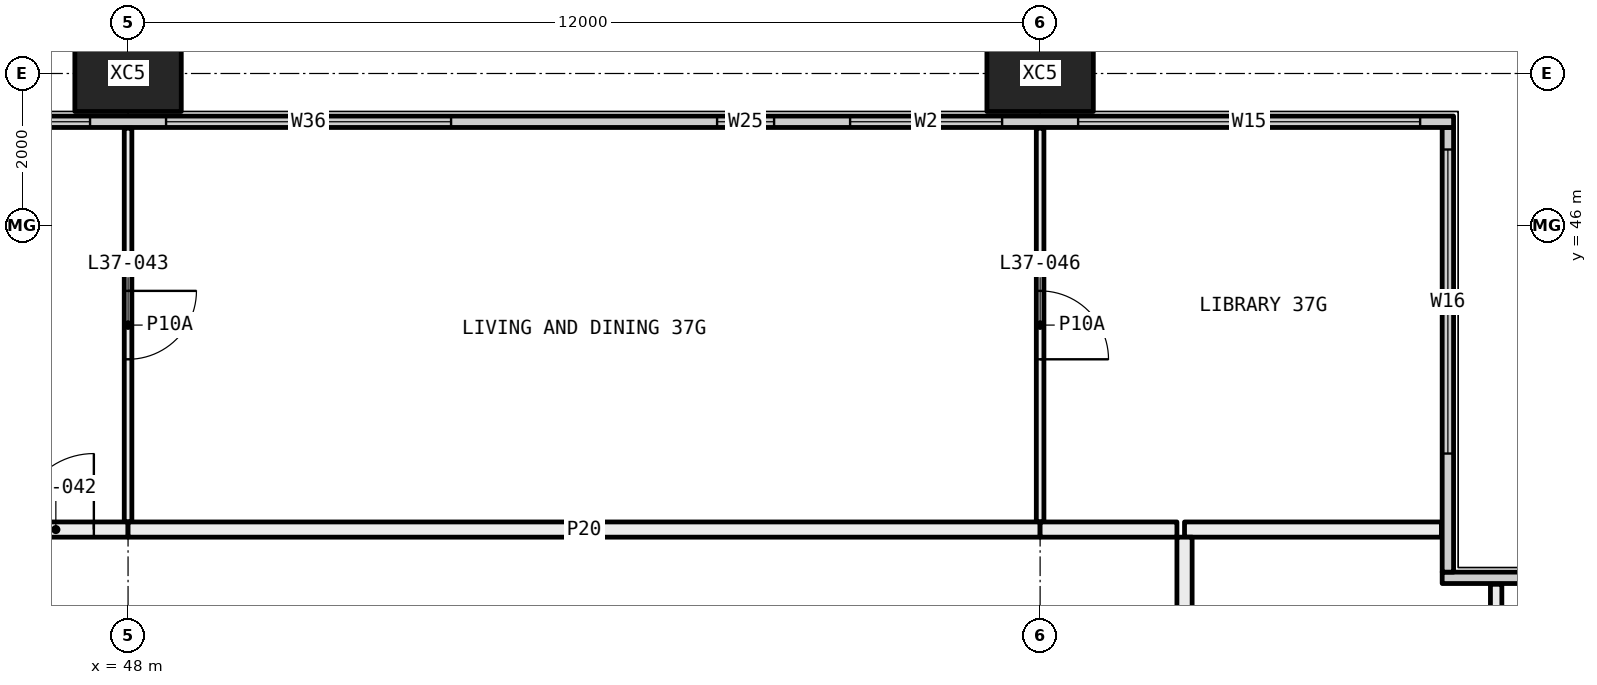
"""IFC4 building model, lengths in metres.
Left out: names, types, materials, properties, quantities, classifications, styles, units other than length and angle.
Written with IfcOpenShell. Run it as: python <this file> out.ifc"""

import sys

from ifc_helpers import new_model, si_unit, direction, frame, frame_2d, origin, origin_2d, place, context, subcontext, project, spatial, rectangle, hollow_rectangle, extrude, element, fill, save


model = new_model("IFC4")
c1 = context("Model", 3, precision=1e-05, world=origin(), true_north=direction((0.0, 1.0)))
c2 = subcontext(c1, "Body", "Model", "MODEL_VIEW")
j1 = project(units=[si_unit("LENGTHUNIT", "METRE"), si_unit("PLANEANGLEUNIT", "RADIAN")], contexts=[c1])
p1 = place(None, origin())
s1 = spatial("IfcSite", under=j1, at=p1, CompositionType="ELEMENT")
p2 = place(p1, origin())
s2 = spatial("IfcBuilding", under=s1, at=p2, CompositionType="ELEMENT")
p3 = place(p2, frame((0.0, 0.0, 141.45)))
s3 = spatial("IfcBuildingStorey", under=s2, at=p3, CompositionType="ELEMENT", Elevation=141.45)
for number, where, z_axis, x_axis in (
    (1, (48.0, 48.0, -0.4), (0.0, 0.0, 1.0), (1.0, 0.0, 0.0)),
    (2, (60.0, 48.0, -0.4), (0.0, 0.0, 1.0), (1.0, 0.0, 0.0)),
):
    element("IfcColumn", number, at=place(p3, frame(where, z_axis=z_axis, x_axis=x_axis)), inside=s3, PredefinedType="COLUMN", context=c2, shape_type="SweptSolid", body=[
        extrude(hollow_rectangle(XDim=1.4, YDim=1.0, WallThickness=0.055, at=origin_2d()), origin(), (0.0, 0.0, 1.0), 3.45),
    ])
p4 = place(p3, frame((65.29, 41.365, 0.0), z_axis=(0.0, 0.0, 1.0), x_axis=(1.0, 0.0, 0.0)))
e3 = element("IfcWall", 3, at=p4, inside=s3, PredefinedType="ELEMENTEDWALL", context=c2, shape_type="SweptSolid", body=[
    extrude(rectangle(XDim=6.15, YDim=0.15, at=frame_2d((3.075, 0.0))), origin(), (0.0, 0.0, 1.0), 3.05),
])
p5 = place(p4, frame((1.71, 0.0, 0.45)))
e4 = element("IfcOpeningElement", 4, at=p5, cuts=e3, PredefinedType="OPENING", context=c2, shape_type="SweptSolid", body=[
    extrude(rectangle(XDim=4.0, YDim=2.55, at=frame_2d((2.0, 1.275))), frame((0.0, 0.085, 0.0), z_axis=(0.0, -1.0, 0.0), x_axis=(1.0, 0.0, 0.0)), (0.0, 0.0, 1.0), 0.17),
])
p6 = place(p3, frame((65.365, 41.44, 0.0), z_axis=(0.0, 0.0, 1.0), x_axis=(0.0, 1.0, 0.0)))
e5 = element("IfcWall", 5, at=p6, inside=s3, PredefinedType="ELEMENTEDWALL", context=c2, shape_type="SweptSolid", body=[
    extrude(rectangle(XDim=5.85, YDim=0.15, at=frame_2d((2.925, 0.0))), origin(), (0.0, 0.0, 1.0), 3.05),
])
p7 = place(p6, frame((1.56, 0.0, 0.45)))
e6 = element("IfcOpeningElement", 6, at=p7, cuts=e5, PredefinedType="OPENING", context=c2, shape_type="SweptSolid", body=[
    extrude(rectangle(XDim=4.0, YDim=2.55, at=frame_2d((2.0, 1.275))), frame((0.0, 0.085, 0.0), z_axis=(0.0, -1.0, 0.0), x_axis=(1.0, 0.0, 0.0)), (0.0, 0.0, 1.0), 0.17),
])
p8 = place(p3, frame((6.56, 47.365, 0.0), z_axis=(0.0, 0.0, 1.0), x_axis=(1.0, 0.0, 0.0)))
e7 = element("IfcWall", 7, at=p8, inside=s3, PredefinedType="ELEMENTEDWALL", context=c2, shape_type="SweptSolid", body=[
    extrude(rectangle(XDim=58.88, YDim=0.15, at=frame_2d((29.44, 0.0))), origin(), (0.0, 0.0, 1.0), 3.05),
])
p9 = place(p8, frame((0.44, 0.0, 0.45)))
e8 = element("IfcOpeningElement", 8, at=p9, cuts=e7, PredefinedType="OPENING", context=c2, shape_type="SweptSolid", body=[
    extrude(rectangle(XDim=4.5, YDim=2.55, at=frame_2d((2.25, 1.275))), frame((0.0, 0.085, 0.0), z_axis=(0.0, -1.0, 0.0), x_axis=(1.0, 0.0, 0.0)), (0.0, 0.0, 1.0), 0.17),
])
p10 = place(p8, frame((5.94, 0.0, 0.45)))
e9 = element("IfcOpeningElement", 9, at=p10, cuts=e7, PredefinedType="OPENING", context=c2, shape_type="SweptSolid", body=[
    extrude(rectangle(XDim=3.75, YDim=2.55, at=frame_2d((1.875, 1.275))), frame((0.0, 0.085, 0.0), z_axis=(0.0, -1.0, 0.0), x_axis=(1.0, 0.0, 0.0)), (0.0, 0.0, 1.0), 0.17),
])
p11 = place(p8, frame((13.19, 0.0, 0.45)))
e10 = element("IfcOpeningElement", 10, at=p11, cuts=e7, PredefinedType="OPENING", context=c2, shape_type="SweptSolid", body=[
    extrude(rectangle(XDim=3.75, YDim=2.55, at=frame_2d((1.875, 1.275))), frame((0.0, 0.085, 0.0), z_axis=(0.0, -1.0, 0.0), x_axis=(1.0, 0.0, 0.0)), (0.0, 0.0, 1.0), 0.17),
])
p12 = place(p8, frame((17.94, 0.0, 0.45)))
e11 = element("IfcOpeningElement", 11, at=p12, cuts=e7, PredefinedType="OPENING", context=c2, shape_type="SweptSolid", body=[
    extrude(rectangle(XDim=3.75, YDim=2.55, at=frame_2d((1.875, 1.275))), frame((0.0, 0.085, 0.0), z_axis=(0.0, -1.0, 0.0), x_axis=(1.0, 0.0, 0.0)), (0.0, 0.0, 1.0), 0.17),
])
p13 = place(p8, frame((25.19, 0.0, 0.45)))
e12 = element("IfcOpeningElement", 12, at=p13, cuts=e7, PredefinedType="OPENING", context=c2, shape_type="SweptSolid", body=[
    extrude(rectangle(XDim=0.75, YDim=2.55, at=frame_2d((0.375, 1.275))), frame((0.0, 0.085, 0.0), z_axis=(0.0, -1.0, 0.0), x_axis=(1.0, 0.0, 0.0)), (0.0, 0.0, 1.0), 0.17),
])
p14 = place(p8, frame((26.94, 0.0, 0.45)))
e13 = element("IfcOpeningElement", 13, at=p14, cuts=e7, PredefinedType="OPENING", context=c2, shape_type="SweptSolid", body=[
    extrude(rectangle(XDim=2.0, YDim=2.55, at=frame_2d((1.0, 1.275))), frame((0.0, 0.085, 0.0), z_axis=(0.0, -1.0, 0.0), x_axis=(1.0, 0.0, 0.0)), (0.0, 0.0, 1.0), 0.17),
])
p15 = place(p8, frame((29.94, 0.0, 0.45)))
e14 = element("IfcOpeningElement", 14, at=p15, cuts=e7, PredefinedType="OPENING", context=c2, shape_type="SweptSolid", body=[
    extrude(rectangle(XDim=3.75, YDim=2.55, at=frame_2d((1.875, 1.275))), frame((0.0, 0.085, 0.0), z_axis=(0.0, -1.0, 0.0), x_axis=(1.0, 0.0, 0.0)), (0.0, 0.0, 1.0), 0.17),
])
p16 = place(p8, frame((37.19, 0.0, 0.45)))
e15 = element("IfcOpeningElement", 15, at=p16, cuts=e7, PredefinedType="OPENING", context=c2, shape_type="SweptSolid", body=[
    extrude(rectangle(XDim=3.75, YDim=2.55, at=frame_2d((1.875, 1.275))), frame((0.0, 0.085, 0.0), z_axis=(0.0, -1.0, 0.0), x_axis=(1.0, 0.0, 0.0)), (0.0, 0.0, 1.0), 0.17),
])
p17 = place(p8, frame((41.94, 0.0, 0.45)))
e16 = element("IfcOpeningElement", 16, at=p17, cuts=e7, PredefinedType="OPENING", context=c2, shape_type="SweptSolid", body=[
    extrude(rectangle(XDim=3.75, YDim=2.55, at=frame_2d((1.875, 1.275))), frame((0.0, 0.085, 0.0), z_axis=(0.0, -1.0, 0.0), x_axis=(1.0, 0.0, 0.0)), (0.0, 0.0, 1.0), 0.17),
])
p18 = place(p8, frame((49.19, 0.0, 0.45)))
e17 = element("IfcOpeningElement", 17, at=p18, cuts=e7, PredefinedType="OPENING", context=c2, shape_type="SweptSolid", body=[
    extrude(rectangle(XDim=0.75, YDim=2.55, at=frame_2d((0.375, 1.275))), frame((0.0, 0.085, 0.0), z_axis=(0.0, -1.0, 0.0), x_axis=(1.0, 0.0, 0.0)), (0.0, 0.0, 1.0), 0.17),
])
p19 = place(p8, frame((50.94, 0.0, 0.45)))
e18 = element("IfcOpeningElement", 18, at=p19, cuts=e7, PredefinedType="OPENING", context=c2, shape_type="SweptSolid", body=[
    extrude(rectangle(XDim=2.0, YDim=2.55, at=frame_2d((1.0, 1.275))), frame((0.0, 0.085, 0.0), z_axis=(0.0, -1.0, 0.0), x_axis=(1.0, 0.0, 0.0)), (0.0, 0.0, 1.0), 0.17),
])
p20 = place(p8, frame((53.94, 0.0, 0.45)))
e19 = element("IfcOpeningElement", 19, at=p20, cuts=e7, PredefinedType="OPENING", context=c2, shape_type="SweptSolid", body=[
    extrude(rectangle(XDim=4.5, YDim=2.55, at=frame_2d((2.25, 1.275))), frame((0.0, 0.085, 0.0), z_axis=(0.0, -1.0, 0.0), x_axis=(1.0, 0.0, 0.0)), (0.0, 0.0, 1.0), 0.17),
])
p21 = place(p3, frame((66.0, 41.28, 0.0), z_axis=(0.0, 0.0, 1.0), x_axis=(0.0, -1.0, 0.0)))
e20 = element("IfcWall", 20, at=p21, inside=s3, PredefinedType="PARTITIONING", context=c2, shape_type="SweptSolid", body=[
    extrude(rectangle(XDim=3.78, YDim=0.15, at=frame_2d((1.89, 0.0))), origin(), (0.0, 0.0, 1.0), 3.05),
])
p22 = place(p3, frame((65.28, 42.0, 0.0), z_axis=(0.0, 0.0, 1.0), x_axis=(-1.0, 0.0, 0.0)))
e21 = element("IfcWall", 21, at=p22, inside=s3, PredefinedType="PARTITIONING", context=c2, shape_type="SweptSolid", body=[
    extrude(rectangle(XDim=3.38, YDim=0.2, at=frame_2d((1.69, 0.0))), origin(), (0.0, 0.0, 1.0), 3.05),
])
p23 = place(p3, frame((61.9, 41.9, 0.0), z_axis=(0.0, 0.0, 1.0), x_axis=(0.0, -1.0, 0.0)))
e22 = element("IfcWall", 22, at=p23, inside=s3, PredefinedType="PARTITIONING", context=c2, shape_type="SweptSolid", body=[
    extrude(rectangle(XDim=4.4, YDim=0.2, at=frame_2d((2.2, 0.0))), origin(), (0.0, 0.0, 1.0), 3.05),
])
p24 = place(p3, frame((48.0, 42.1, 0.0), z_axis=(0.0, 0.0, 1.0), x_axis=(0.0, 1.0, 0.0)))
e23 = element("IfcWall", 23, at=p24, inside=s3, PredefinedType="PARTITIONING", context=c2, shape_type="SweptSolid", body=[
    extrude(rectangle(XDim=5.18, YDim=0.1, at=frame_2d((2.59, 0.0))), origin(), (0.0, 0.0, 1.0), 3.05),
])
p25 = place(p24, frame((2.14, 0.0, 0.0)))
e24 = element("IfcOpeningElement", 24, at=p25, cuts=e23, PredefinedType="OPENING", context=c2, shape_type="SweptSolid", body=[
    extrude(rectangle(XDim=0.9, YDim=2.1, at=frame_2d((0.45, 1.05))), frame((0.0, 0.06, 0.0), z_axis=(0.0, -1.0, 0.0), x_axis=(1.0, 0.0, 0.0)), (0.0, 0.0, 1.0), 0.12),
])
p26 = place(p3, frame((46.1, 42.0, 0.0), z_axis=(0.0, 0.0, 1.0), x_axis=(1.0, 0.0, 0.0)))
e25 = element("IfcWall", 25, at=p26, inside=s3, PredefinedType="PARTITIONING", context=c2, shape_type="SweptSolid", body=[
    extrude(rectangle(XDim=1.9, YDim=0.2, at=frame_2d((0.95, 0.0))), origin(), (0.0, 0.0, 1.0), 3.05),
])
p27 = place(p26, frame((0.45, 0.0, 0.0)))
e26 = element("IfcOpeningElement", 26, at=p27, cuts=e25, PredefinedType="OPENING", context=c2, shape_type="SweptSolid", body=[
    extrude(rectangle(XDim=1.0, YDim=2.1, at=frame_2d((0.5, 1.05))), frame((0.0, 0.11, 0.0), z_axis=(0.0, -1.0, 0.0), x_axis=(1.0, 0.0, 0.0)), (0.0, 0.0, 1.0), 0.22),
])
p28 = place(p3, frame((60.0, 42.1, 0.0), z_axis=(0.0, 0.0, 1.0), x_axis=(0.0, 1.0, 0.0)))
e27 = element("IfcWall", 27, at=p28, inside=s3, PredefinedType="PARTITIONING", context=c2, shape_type="SweptSolid", body=[
    extrude(rectangle(XDim=5.18, YDim=0.1, at=frame_2d((2.59, 0.0))), origin(), (0.0, 0.0, 1.0), 3.05),
])
p29 = place(p28, frame((2.14, 0.0, 0.0)))
e28 = element("IfcOpeningElement", 28, at=p29, cuts=e27, PredefinedType="OPENING", context=c2, shape_type="SweptSolid", body=[
    extrude(rectangle(XDim=0.9, YDim=2.1, at=frame_2d((0.45, 1.05))), frame((0.0, 0.06, 0.0), z_axis=(0.0, -1.0, 0.0), x_axis=(1.0, 0.0, 0.0)), (0.0, 0.0, 1.0), 0.12),
])
p30 = place(p3, frame((48.0, 42.0, 0.0), z_axis=(0.0, 0.0, 1.0), x_axis=(1.0, 0.0, 0.0)))
e29 = element("IfcWall", 29, at=p30, inside=s3, PredefinedType="PARTITIONING", context=c2, shape_type="SweptSolid", body=[
    extrude(rectangle(XDim=12.0, YDim=0.2, at=frame_2d((6.0, 0.0))), origin(), (0.0, 0.0, 1.0), 3.05),
])
p31 = place(p3, frame((60.0, 42.0, 0.0), z_axis=(0.0, 0.0, 1.0), x_axis=(1.0, 0.0, 0.0)))
e30 = element("IfcWall", 30, at=p31, inside=s3, PredefinedType="PARTITIONING", context=c2, shape_type="SweptSolid", body=[
    extrude(rectangle(XDim=1.8, YDim=0.2, at=frame_2d((0.9, 0.0))), origin(), (0.0, 0.0, 1.0), 3.05),
])
p32 = place(p7, origin())
e31 = element("IfcWindow", 31, at=p32, inside=s3, PartitioningType="SINGLE_PANEL", PredefinedType="WINDOW", context=c2, shape_type="SweptSolid", body=[
    extrude(rectangle(XDim=4.0, YDim=2.55, at=frame_2d((2.0, 1.275))), frame((0.0, 0.03, 0.0), z_axis=(0.0, -1.0, 0.0), x_axis=(1.0, 0.0, 0.0)), (0.0, 0.0, 1.0), 0.06),
])
fill(e6, e31)
p33 = place(p16, origin())
e32 = element("IfcWindow", 32, at=p33, inside=s3, PartitioningType="SINGLE_PANEL", PredefinedType="WINDOW", context=c2, shape_type="SweptSolid", body=[
    extrude(rectangle(XDim=3.75, YDim=2.55, at=frame_2d((1.875, 1.275))), frame((0.0, 0.03, 0.0), z_axis=(0.0, -1.0, 0.0), x_axis=(1.0, 0.0, 0.0)), (0.0, 0.0, 1.0), 0.06),
])
fill(e15, e32)
p34 = place(p17, origin())
e33 = element("IfcWindow", 33, at=p34, inside=s3, PartitioningType="SINGLE_PANEL", PredefinedType="WINDOW", context=c2, shape_type="SweptSolid", body=[
    extrude(rectangle(XDim=3.75, YDim=2.55, at=frame_2d((1.875, 1.275))), frame((0.0, 0.03, 0.0), z_axis=(0.0, -1.0, 0.0), x_axis=(1.0, 0.0, 0.0)), (0.0, 0.0, 1.0), 0.06),
])
fill(e16, e33)
p35 = place(p18, origin())
e34 = element("IfcWindow", 34, at=p35, inside=s3, PartitioningType="SINGLE_PANEL", PredefinedType="WINDOW", context=c2, shape_type="SweptSolid", body=[
    extrude(rectangle(XDim=0.75, YDim=2.55, at=frame_2d((0.375, 1.275))), frame((0.0, 0.03, 0.0), z_axis=(0.0, -1.0, 0.0), x_axis=(1.0, 0.0, 0.0)), (0.0, 0.0, 1.0), 0.06),
])
fill(e17, e34)
p36 = place(p19, origin())
e35 = element("IfcWindow", 35, at=p36, inside=s3, PartitioningType="SINGLE_PANEL", PredefinedType="WINDOW", context=c2, shape_type="SweptSolid", body=[
    extrude(rectangle(XDim=2.0, YDim=2.55, at=frame_2d((1.0, 1.275))), frame((0.0, 0.03, 0.0), z_axis=(0.0, -1.0, 0.0), x_axis=(1.0, 0.0, 0.0)), (0.0, 0.0, 1.0), 0.06),
])
fill(e18, e35)
p37 = place(p20, origin())
e36 = element("IfcWindow", 36, at=p37, inside=s3, PartitioningType="SINGLE_PANEL", PredefinedType="WINDOW", context=c2, shape_type="SweptSolid", body=[
    extrude(rectangle(XDim=4.5, YDim=2.55, at=frame_2d((2.25, 1.275))), frame((0.0, 0.03, 0.0), z_axis=(0.0, -1.0, 0.0), x_axis=(1.0, 0.0, 0.0)), (0.0, 0.0, 1.0), 0.06),
])
fill(e19, e36)
p38 = place(p27, origin())
e37 = element("IfcDoor", 37, at=p38, inside=s3, OperationType="SINGLE_SWING_LEFT", PredefinedType="DOOR", context=c2, shape_type="SweptSolid", body=[
    extrude(rectangle(XDim=1.0, YDim=2.1, at=frame_2d((0.5, 1.05))), frame((0.0, 0.025, 0.0), z_axis=(0.0, -1.0, 0.0), x_axis=(1.0, 0.0, 0.0)), (0.0, 0.0, 1.0), 0.05),
])
fill(e26, e37)
p39 = place(p25, frame((0.9, 0.0, 0.0), x_axis=(-1.0, 0.0, 0.0)))
e38 = element("IfcDoor", 38, at=p39, inside=s3, OperationType="SINGLE_SWING_RIGHT", PredefinedType="DOOR", context=c2, shape_type="SweptSolid", body=[
    extrude(rectangle(XDim=0.9, YDim=2.1, at=frame_2d((0.45, 1.05))), frame((0.0, 0.025, 0.0), z_axis=(0.0, -1.0, 0.0), x_axis=(1.0, 0.0, 0.0)), (0.0, 0.0, 1.0), 0.05),
])
fill(e24, e38)
p40 = place(p29, frame((0.9, 0.0, 0.0), x_axis=(-1.0, 0.0, 0.0)))
e39 = element("IfcDoor", 39, at=p40, inside=s3, OperationType="SINGLE_SWING_LEFT", PredefinedType="DOOR", context=c2, shape_type="SweptSolid", body=[
    extrude(rectangle(XDim=0.9, YDim=2.1, at=frame_2d((0.45, 1.05))), frame((0.0, 0.025, 0.0), z_axis=(0.0, -1.0, 0.0), x_axis=(1.0, 0.0, 0.0)), (0.0, 0.0, 1.0), 0.05),
])
fill(e28, e39)
save(model, sys.argv[1])
